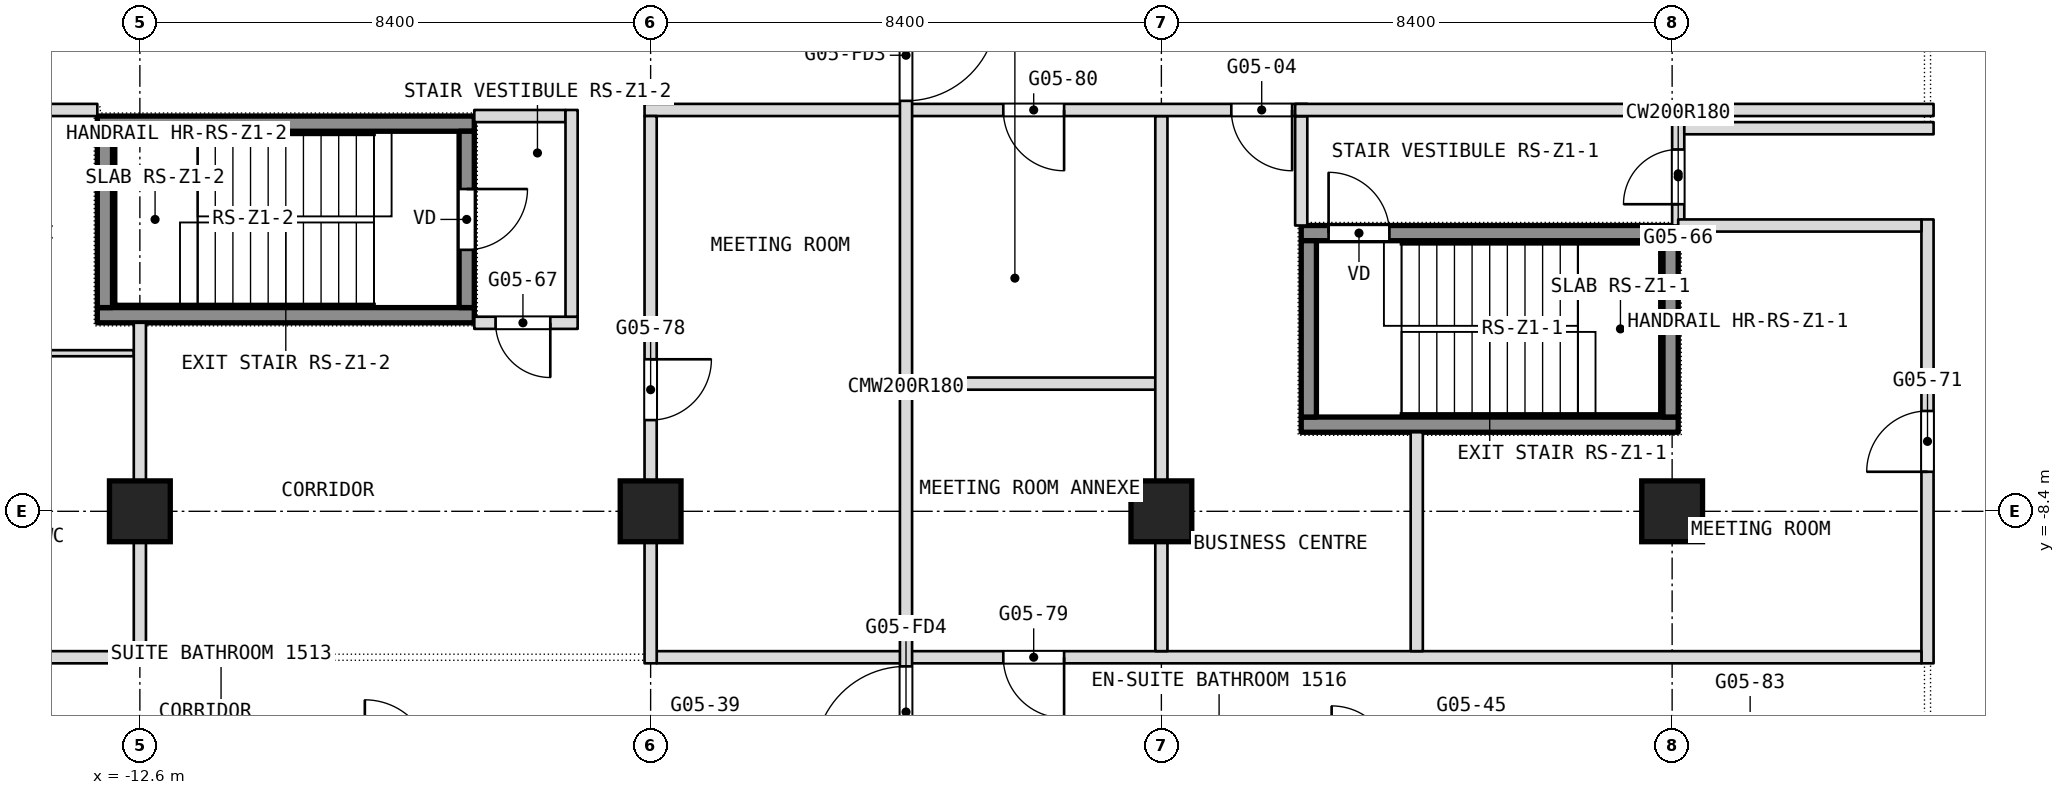
"""IFC4 building model, lengths in metres.
Left out: names, types, materials, properties, quantities, classifications, styles, units other than length and angle.
Written with IfcOpenShell. Run it as: python <this file> out.ifc"""

import sys

from ifc_helpers import new_model, si_unit, direction, frame, frame_2d, origin, origin_2d, place, context, subcontext, project, spatial, rectangle, extrude, element, fill, save


model = new_model("IFC4")
c1 = context("Model", 3, precision=1e-05, world=origin(), true_north=direction((0.0, 1.0)))
c2 = subcontext(c1, "Body", "Model", "MODEL_VIEW")
j1 = project(units=[si_unit("LENGTHUNIT", "METRE"), si_unit("PLANEANGLEUNIT", "RADIAN")], contexts=[c1])
p1 = place(None, origin())
s1 = spatial("IfcSite", under=j1, at=p1, CompositionType="ELEMENT")
p2 = place(p1, origin())
s2 = spatial("IfcBuilding", under=s1, at=p2, CompositionType="ELEMENT")
p3 = place(p2, frame((0.0, 0.0, 68.9)))
s3 = spatial("IfcBuildingStorey", under=s2, at=p3, CompositionType="ELEMENT", Elevation=68.9)
for number, where, z_axis, x_axis in (
    (1, (-12.6, -8.4, 0.0), (0.0, 0.0, 1.0), (1.0, 0.0, 0.0)),
    (2, (-4.2, -8.4, 0.0), (0.0, 0.0, 1.0), (1.0, 0.0, 0.0)),
    (3, (4.2, -8.4, 0.0), (0.0, 0.0, 1.0), (1.0, 0.0, 0.0)),
    (4, (12.6, -8.4, 0.0), (0.0, 0.0, 1.0), (1.0, 0.0, 0.0)),
):
    element("IfcColumn", number, at=place(p3, frame(where, z_axis=z_axis, x_axis=x_axis)), inside=s3, PredefinedType="COLUMN", context=c2, shape_type="SweptSolid", body=[
        extrude(rectangle(XDim=1.0, YDim=1.0, at=origin_2d()), origin(), (0.0, 0.0, 1.0), 3.6),
    ])
p4 = place(p3, frame((16.8, -10.9, 0.0), z_axis=(0.0, 0.0, 1.0), x_axis=(0.0, 1.0, 0.0)))
e5 = element("IfcWall", 5, at=p4, inside=s3, PredefinedType="PARTITIONING", context=c2, shape_type="SweptSolid", body=[
    extrude(rectangle(XDim=7.3, YDim=0.2, at=frame_2d((3.65, 0.0))), origin(), (0.0, 0.0, 1.0), 3.34),
])
p5 = place(p4, frame((3.15, 0.0, 0.0)))
e6 = element("IfcOpeningElement", 6, at=p5, cuts=e5, PredefinedType="OPENING", context=c2, shape_type="SweptSolid", body=[
    extrude(rectangle(XDim=1.0, YDim=2.1, at=frame_2d((0.5, 1.05))), frame((0.0, 0.1, 0.0), z_axis=(0.0, -1.0, 0.0), x_axis=(1.0, 0.0, 0.0)), (0.0, 0.0, 1.0), 0.2),
])
p6 = place(p3, frame((12.7, -3.7, 0.0), z_axis=(0.0, 0.0, 1.0), x_axis=(0.0, 1.0, 0.0)))
e7 = element("IfcWall", 7, at=p6, inside=s3, PredefinedType="PARTITIONING", context=c2, shape_type="SweptSolid", body=[
    extrude(rectangle(XDim=1.7, YDim=0.2, at=frame_2d((0.85, 0.0))), origin(), (0.0, 0.0, 1.0), 3.34),
])
p7 = place(p6, frame((0.35, 0.0, 0.0)))
e8 = element("IfcOpeningElement", 8, at=p7, cuts=e7, PredefinedType="OPENING", context=c2, shape_type="SweptSolid", body=[
    extrude(rectangle(XDim=0.9, YDim=2.1, at=frame_2d((0.45, 1.05))), frame((0.0, 0.1, 0.0), z_axis=(0.0, -1.0, 0.0), x_axis=(1.0, 0.0, 0.0)), (0.0, 0.0, 1.0), 0.2),
])
p8 = place(p3, frame((-16.7, -10.8, 0.0), z_axis=(0.0, 0.0, 1.0), x_axis=(1.0, 0.0, 0.0)))
e9 = element("IfcWall", 9, at=p8, inside=s3, PredefinedType="PARTITIONING", context=c2, shape_type="SweptSolid", body=[
    extrude(rectangle(XDim=4.0, YDim=0.2, at=frame_2d((2.0, 0.0))), origin(), (0.0, 0.0, 1.0), 3.34),
])
p9 = place(p3, frame((-4.1, -10.8, 0.0), z_axis=(0.0, 0.0, 1.0), x_axis=(1.0, 0.0, 0.0)))
e10 = element("IfcWall", 10, at=p9, inside=s3, PredefinedType="PARTITIONING", context=c2, shape_type="SweptSolid", body=[
    extrude(rectangle(XDim=20.8, YDim=0.2, at=frame_2d((10.4, 0.0))), origin(), (0.0, 0.0, 1.0), 3.34),
])
p10 = place(p9, frame((5.7, 0.0, 0.0)))
e11 = element("IfcOpeningElement", 11, at=p10, cuts=e10, PredefinedType="OPENING", context=c2, shape_type="SweptSolid", body=[
    extrude(rectangle(XDim=1.0, YDim=2.1, at=frame_2d((0.5, 1.05))), frame((0.0, 0.1, 0.0), z_axis=(0.0, -1.0, 0.0), x_axis=(1.0, 0.0, 0.0)), (0.0, 0.0, 1.0), 0.2),
])
p11 = place(p3, frame((8.4, -10.7, 0.0), z_axis=(0.0, 0.0, 1.0), x_axis=(0.0, 1.0, 0.0)))
e12 = element("IfcWall", 12, at=p11, inside=s3, PredefinedType="PARTITIONING", context=c2, shape_type="SweptSolid", body=[
    extrude(rectangle(XDim=3.6, YDim=0.2, at=frame_2d((1.8, 0.0))), origin(), (0.0, 0.0, 1.0), 3.34),
])
p12 = place(p3, frame((6.5, -3.7, 0.0), z_axis=(0.0, 0.0, 1.0), x_axis=(0.0, 1.0, 0.0)))
e13 = element("IfcWall", 13, at=p12, inside=s3, PredefinedType="PARTITIONING", context=c2, shape_type="SweptSolid", body=[
    extrude(rectangle(XDim=1.8, YDim=0.2, at=frame_2d((0.9, 0.0))), origin(), (0.0, 0.0, 1.0), 3.34),
])
p13 = place(p3, frame((0.1, -6.3, 0.0), z_axis=(0.0, 0.0, 1.0), x_axis=(1.0, 0.0, 0.0)))
e14 = element("IfcWall", 14, at=p13, inside=s3, PredefinedType="PARTITIONING", context=c2, shape_type="SweptSolid", body=[
    extrude(rectangle(XDim=4.0, YDim=0.2, at=frame_2d((2.0, 0.0))), origin(), (0.0, 0.0, 1.0), 3.34),
])
p14 = place(p3, frame((-16.7, -5.8, 0.0), z_axis=(0.0, 0.0, 1.0), x_axis=(1.0, 0.0, 0.0)))
e15 = element("IfcWall", 15, at=p14, inside=s3, PredefinedType="PARTITIONING", context=c2, shape_type="SweptSolid", body=[
    extrude(rectangle(XDim=4.0, YDim=0.1, at=frame_2d((2.0, 0.0))), origin(), (0.0, 0.0, 1.0), 3.34),
])
p15 = place(p14, frame((1.55, 0.0, 0.0)))
e16 = element("IfcOpeningElement", 16, at=p15, cuts=e15, PredefinedType="OPENING", context=c2, shape_type="SweptSolid", body=[
    extrude(rectangle(XDim=0.9, YDim=2.1, at=frame_2d((0.45, 1.05))), frame((0.0, 0.05, 0.0), z_axis=(0.0, -1.0, 0.0), x_axis=(1.0, 0.0, 0.0)), (0.0, 0.0, 1.0), 0.1),
])
p16 = place(p3, frame((-7.1, -5.3, 0.0), z_axis=(0.0, 0.0, 1.0), x_axis=(1.0, 0.0, 0.0)))
e17 = element("IfcWall", 17, at=p16, inside=s3, PredefinedType="PARTITIONING", context=c2, shape_type="SweptSolid", body=[
    extrude(rectangle(XDim=1.7, YDim=0.2, at=frame_2d((0.85, 0.0))), origin(), (0.0, 0.0, 1.0), 3.34),
])
p17 = place(p16, frame((0.35, 0.0, 0.0)))
e18 = element("IfcOpeningElement", 18, at=p17, cuts=e17, PredefinedType="OPENING", context=c2, shape_type="SweptSolid", body=[
    extrude(rectangle(XDim=0.9, YDim=2.1, at=frame_2d((0.45, 1.05))), frame((0.0, 0.1, 0.0), z_axis=(0.0, -1.0, 0.0), x_axis=(1.0, 0.0, 0.0)), (0.0, 0.0, 1.0), 0.2),
])
p18 = place(p3, frame((4.2, -10.7, 0.0), z_axis=(0.0, 0.0, 1.0), x_axis=(0.0, 1.0, 0.0)))
e19 = element("IfcWall", 19, at=p18, inside=s3, PredefinedType="PARTITIONING", context=c2, shape_type="SweptSolid", body=[
    extrude(rectangle(XDim=8.8, YDim=0.2, at=frame_2d((4.4, 0.0))), origin(), (0.0, 0.0, 1.0), 3.34),
])
p19 = place(p3, frame((12.7, -3.7, 0.0), z_axis=(0.0, 0.0, 1.0), x_axis=(1.0, 0.0, 0.0)))
e20 = element("IfcWall", 20, at=p19, inside=s3, PredefinedType="PARTITIONING", context=c2, shape_type="SweptSolid", body=[
    extrude(rectangle(XDim=4.0, YDim=0.2, at=frame_2d((2.0, 0.0))), origin(), (0.0, 0.0, 1.0), 3.34),
])
p20 = place(p3, frame((12.8, -2.1, 0.0), z_axis=(0.0, 0.0, 1.0), x_axis=(1.0, 0.0, 0.0)))
e21 = element("IfcWall", 21, at=p20, inside=s3, PredefinedType="PARTITIONING", context=c2, shape_type="SweptSolid", body=[
    extrude(rectangle(XDim=4.1, YDim=0.2, at=frame_2d((2.05, 0.0))), origin(), (0.0, 0.0, 1.0), 3.34),
])
p21 = place(p3, frame((-7.1, -1.9, 0.0), z_axis=(0.0, 0.0, 1.0), x_axis=(1.0, 0.0, 0.0)))
e22 = element("IfcWall", 22, at=p21, inside=s3, PredefinedType="PARTITIONING", context=c2, shape_type="SweptSolid", body=[
    extrude(rectangle(XDim=1.5, YDim=0.2, at=frame_2d((0.75, 0.0))), origin(), (0.0, 0.0, 1.0), 3.34),
])
p22 = place(p3, frame((-16.9, -1.8, 0.0), z_axis=(0.0, 0.0, 1.0), x_axis=(1.0, 0.0, 0.0)))
e23 = element("IfcWall", 23, at=p22, inside=s3, PredefinedType="PARTITIONING", context=c2, shape_type="SweptSolid", body=[
    extrude(rectangle(XDim=3.6, YDim=0.2, at=frame_2d((1.8, 0.0))), origin(), (0.0, 0.0, 1.0), 3.34),
])
p23 = place(p22, frame((1.7, 0.0, 0.0)))
e24 = element("IfcOpeningElement", 24, at=p23, cuts=e23, PredefinedType="OPENING", context=c2, shape_type="SweptSolid", body=[
    extrude(rectangle(XDim=1.0, YDim=2.1, at=frame_2d((0.5, 1.05))), frame((0.0, 0.1, 0.0), z_axis=(0.0, -1.0, 0.0), x_axis=(1.0, 0.0, 0.0)), (0.0, 0.0, 1.0), 0.2),
])
p24 = place(p3, frame((-4.3, -1.8, 0.0), z_axis=(0.0, 0.0, 1.0), x_axis=(1.0, 0.0, 0.0)))
e25 = element("IfcWall", 25, at=p24, inside=s3, PredefinedType="PARTITIONING", context=c2, shape_type="SweptSolid", body=[
    extrude(rectangle(XDim=10.9, YDim=0.2, at=frame_2d((5.45, 0.0))), origin(), (0.0, 0.0, 1.0), 3.34),
])
p25 = place(p24, frame((9.65, 0.0, 0.0)))
e26 = element("IfcOpeningElement", 26, at=p25, cuts=e25, PredefinedType="OPENING", context=c2, shape_type="SweptSolid", body=[
    extrude(rectangle(XDim=1.0, YDim=2.1, at=frame_2d((0.5, 1.05))), frame((0.0, 0.1, 0.0), z_axis=(0.0, -1.0, 0.0), x_axis=(1.0, 0.0, 0.0)), (0.0, 0.0, 1.0), 0.2),
])
p26 = place(p24, frame((5.9, 0.0, 0.0)))
e27 = element("IfcOpeningElement", 27, at=p26, cuts=e25, PredefinedType="OPENING", context=c2, shape_type="SweptSolid", body=[
    extrude(rectangle(XDim=1.0, YDim=2.1, at=frame_2d((0.5, 1.05))), frame((0.0, 0.1, 0.0), z_axis=(0.0, -1.0, 0.0), x_axis=(1.0, 0.0, 0.0)), (0.0, 0.0, 1.0), 0.2),
])
p27 = place(p3, frame((6.4, -1.8, 0.0), z_axis=(0.0, 0.0, 1.0), x_axis=(1.0, 0.0, 0.0)))
e28 = element("IfcWall", 28, at=p27, inside=s3, PredefinedType="PARTITIONING", context=c2, shape_type="SweptSolid", body=[
    extrude(rectangle(XDim=10.5, YDim=0.2, at=frame_2d((5.25, 0.0))), origin(), (0.0, 0.0, 1.0), 3.34),
])
p28 = place(p3, frame((0.0, -12.7, 0.0), z_axis=(0.0, 0.0, 1.0), x_axis=(0.0, 1.0, 0.0)))
e29 = element("IfcWall", 29, at=p28, inside=s3, PredefinedType="PARTITIONING", context=c2, shape_type="SweptSolid", body=[
    extrude(rectangle(XDim=12.7, YDim=0.2, at=frame_2d((6.35, 0.0))), origin(), (0.0, 0.0, 1.0), 3.34),
])
p29 = place(p28, frame((11.05, 0.0, 0.0)))
e30 = element("IfcOpeningElement", 30, at=p29, cuts=e29, PredefinedType="OPENING", context=c2, shape_type="SweptSolid", body=[
    extrude(rectangle(XDim=1.5, YDim=2.1, at=frame_2d((0.75, 1.05))), frame((0.0, 0.1, 0.0), z_axis=(0.0, -1.0, 0.0), x_axis=(1.0, 0.0, 0.0)), (0.0, 0.0, 1.0), 0.2),
])
p30 = place(p28, frame((0.25, 0.0, 0.0)))
e31 = element("IfcOpeningElement", 31, at=p30, cuts=e29, PredefinedType="OPENING", context=c2, shape_type="SweptSolid", body=[
    extrude(rectangle(XDim=1.5, YDim=2.1, at=frame_2d((0.75, 1.05))), frame((0.0, 0.1, 0.0), z_axis=(0.0, -1.0, 0.0), x_axis=(1.0, 0.0, 0.0)), (0.0, 0.0, 1.0), 0.2),
])
p31 = place(p3, frame((-4.2, -10.9, 0.0), z_axis=(0.0, 0.0, 1.0), x_axis=(0.0, 1.0, 0.0)))
e32 = element("IfcWall", 32, at=p31, inside=s3, PredefinedType="PARTITIONING", context=c2, shape_type="SweptSolid", body=[
    extrude(rectangle(XDim=9.0, YDim=0.2, at=frame_2d((4.5, 0.0))), origin(), (0.0, 0.0, 1.0), 3.34),
])
p32 = place(p31, frame((4.0, 0.0, 0.0)))
e33 = element("IfcOpeningElement", 33, at=p32, cuts=e32, PredefinedType="OPENING", context=c2, shape_type="SweptSolid", body=[
    extrude(rectangle(XDim=1.0, YDim=2.1, at=frame_2d((0.5, 1.05))), frame((0.0, 0.1, 0.0), z_axis=(0.0, -1.0, 0.0), x_axis=(1.0, 0.0, 0.0)), (0.0, 0.0, 1.0), 0.2),
])
p33 = place(p3, frame((-5.5, -5.2, 0.0), z_axis=(0.0, 0.0, 1.0), x_axis=(0.0, 1.0, 0.0)))
e34 = element("IfcWall", 34, at=p33, inside=s3, PredefinedType="PARTITIONING", context=c2, shape_type="SweptSolid", body=[
    extrude(rectangle(XDim=3.4, YDim=0.2, at=frame_2d((1.7, 0.0))), origin(), (0.0, 0.0, 1.0), 3.34),
])
p34 = place(p3, frame((-12.6, -10.9, 0.0), z_axis=(0.0, 0.0, 1.0), x_axis=(0.0, 1.0, 0.0)))
e35 = element("IfcWall", 35, at=p34, inside=s3, PredefinedType="PARTITIONING", context=c2, shape_type="SweptSolid", body=[
    extrude(rectangle(XDim=5.6, YDim=0.2, at=frame_2d((2.8, 0.0))), origin(), (0.0, 0.0, 1.0), 3.34),
])
p35 = place(p3, frame((6.5, -6.975, 0.1), z_axis=(0.0, 0.0, 1.0), x_axis=(1.0, 0.0, 0.0)))
e36 = element("IfcWall", 36, at=p35, inside=s3, PredefinedType="SHEAR", context=c2, shape_type="SweptSolid", body=[
    extrude(rectangle(XDim=6.2, YDim=0.25, at=frame_2d((3.1, 0.0))), origin(), (0.0, 0.0, 1.0), 3.6),
])
p36 = place(p3, frame((6.5, -3.825, 0.1), z_axis=(0.0, 0.0, 1.0), x_axis=(1.0, 0.0, 0.0)))
e37 = element("IfcWall", 37, at=p36, inside=s3, PredefinedType="SHEAR", context=c2, shape_type="SweptSolid", body=[
    extrude(rectangle(XDim=6.2, YDim=0.25, at=frame_2d((3.1, 0.0))), origin(), (0.0, 0.0, 1.0), 3.6),
])
p37 = place(p36, frame((0.45, 0.0, 0.0)))
e38 = element("IfcOpeningElement", 38, at=p37, cuts=e37, PredefinedType="OPENING", context=c2, shape_type="SweptSolid", body=[
    extrude(rectangle(XDim=1.0, YDim=2.1, at=frame_2d((0.5, 1.05))), frame((0.0, 0.125, 0.0), z_axis=(0.0, -1.0, 0.0), x_axis=(1.0, 0.0, 0.0)), (0.0, 0.0, 1.0), 0.25),
])
for number, where, z_axis, x_axis in (
    (39, (6.625, -6.85, 0.1), (0.0, 0.0, 1.0), (0.0, 1.0, 0.0)),
    (40, (12.575, -6.85, 0.1), (0.0, 0.0, 1.0), (0.0, 1.0, 0.0)),
):
    element("IfcWall", number, at=place(p3, frame(where, z_axis=z_axis, x_axis=x_axis)), inside=s3, PredefinedType="SHEAR", context=c2, shape_type="SweptSolid", body=[
        extrude(rectangle(XDim=2.9, YDim=0.25, at=frame_2d((1.45, 0.0))), origin(), (0.0, 0.0, 1.0), 3.6),
    ])
for number, where, z_axis, x_axis in (
    (41, (-13.3, -5.175, 0.1), (0.0, 0.0, 1.0), (1.0, 0.0, 0.0)),
    (42, (-13.3, -2.025, 0.1), (0.0, 0.0, 1.0), (1.0, 0.0, 0.0)),
):
    element("IfcWall", number, at=place(p3, frame(where, z_axis=z_axis, x_axis=x_axis)), inside=s3, PredefinedType="SHEAR", context=c2, shape_type="SweptSolid", body=[
        extrude(rectangle(XDim=6.2, YDim=0.25, at=frame_2d((3.1, 0.0))), origin(), (0.0, 0.0, 1.0), 3.6),
    ])
p38 = place(p3, frame((-13.175, -5.05, 0.1), z_axis=(0.0, 0.0, 1.0), x_axis=(0.0, 1.0, 0.0)))
e43 = element("IfcWall", 43, at=p38, inside=s3, PredefinedType="SHEAR", context=c2, shape_type="SweptSolid", body=[
    extrude(rectangle(XDim=2.9, YDim=0.25, at=frame_2d((1.45, 0.0))), origin(), (0.0, 0.0, 1.0), 3.6),
])
p39 = place(p3, frame((-7.225, -5.05, 0.1), z_axis=(0.0, 0.0, 1.0), x_axis=(0.0, 1.0, 0.0)))
e44 = element("IfcWall", 44, at=p39, inside=s3, PredefinedType="SHEAR", context=c2, shape_type="SweptSolid", body=[
    extrude(rectangle(XDim=2.9, YDim=0.25, at=frame_2d((1.45, 0.0))), origin(), (0.0, 0.0, 1.0), 3.6),
])
p40 = place(p39, frame((0.95, 0.0, 0.0)))
e45 = element("IfcOpeningElement", 45, at=p40, cuts=e44, PredefinedType="OPENING", context=c2, shape_type="SweptSolid", body=[
    extrude(rectangle(XDim=1.0, YDim=2.1, at=frame_2d((0.5, 1.05))), frame((0.0, 0.125, 0.0), z_axis=(0.0, -1.0, 0.0), x_axis=(1.0, 0.0, 0.0)), (0.0, 0.0, 1.0), 0.25),
])
p41 = place(p5, origin())
e46 = element("IfcDoor", 46, at=p41, inside=s3, OperationType="SINGLE_SWING_LEFT", PredefinedType="DOOR", context=c2, shape_type="SweptSolid", body=[
    extrude(rectangle(XDim=1.0, YDim=2.1, at=frame_2d((0.5, 1.05))), frame((0.0, 0.025, 0.0), z_axis=(0.0, -1.0, 0.0), x_axis=(1.0, 0.0, 0.0)), (0.0, 0.0, 1.0), 0.05),
])
fill(e6, e46)
p42 = place(p7, origin())
e47 = element("IfcDoor", 47, at=p42, inside=s3, OperationType="SINGLE_SWING_LEFT", PredefinedType="DOOR", context=c2, shape_type="SweptSolid", body=[
    extrude(rectangle(XDim=0.9, YDim=2.1, at=frame_2d((0.45, 1.05))), frame((0.0, 0.025, 0.0), z_axis=(0.0, -1.0, 0.0), x_axis=(1.0, 0.0, 0.0)), (0.0, 0.0, 1.0), 0.05),
])
fill(e8, e47)
p43 = place(p10, origin())
e48 = element("IfcDoor", 48, at=p43, inside=s3, OperationType="SINGLE_SWING_LEFT", PredefinedType="DOOR", context=c2, shape_type="SweptSolid", body=[
    extrude(rectangle(XDim=1.0, YDim=2.1, at=frame_2d((0.5, 1.05))), frame((0.0, 0.025, 0.0), z_axis=(0.0, -1.0, 0.0), x_axis=(1.0, 0.0, 0.0)), (0.0, 0.0, 1.0), 0.05),
])
fill(e11, e48)
p44 = place(p17, origin())
e49 = element("IfcDoor", 49, at=p44, inside=s3, OperationType="SINGLE_SWING_RIGHT", PredefinedType="DOOR", context=c2, shape_type="SweptSolid", body=[
    extrude(rectangle(XDim=0.9, YDim=2.1, at=frame_2d((0.45, 1.05))), frame((0.0, 0.025, 0.0), z_axis=(0.0, -1.0, 0.0), x_axis=(1.0, 0.0, 0.0)), (0.0, 0.0, 1.0), 0.05),
])
fill(e18, e49)
p45 = place(p25, origin())
e50 = element("IfcDoor", 50, at=p45, inside=s3, OperationType="SINGLE_SWING_LEFT", PredefinedType="DOOR", context=c2, shape_type="SweptSolid", body=[
    extrude(rectangle(XDim=1.0, YDim=2.1, at=frame_2d((0.5, 1.05))), frame((0.0, 0.025, 0.0), z_axis=(0.0, -1.0, 0.0), x_axis=(1.0, 0.0, 0.0)), (0.0, 0.0, 1.0), 0.05),
])
fill(e26, e50)
p46 = place(p26, origin())
e51 = element("IfcDoor", 51, at=p46, inside=s3, OperationType="SINGLE_SWING_RIGHT", PredefinedType="DOOR", context=c2, shape_type="SweptSolid", body=[
    extrude(rectangle(XDim=1.0, YDim=2.1, at=frame_2d((0.5, 1.05))), frame((0.0, 0.025, 0.0), z_axis=(0.0, -1.0, 0.0), x_axis=(1.0, 0.0, 0.0)), (0.0, 0.0, 1.0), 0.05),
])
fill(e27, e51)
p47 = place(p32, origin())
e52 = element("IfcDoor", 52, at=p47, inside=s3, OperationType="SINGLE_SWING_LEFT", PredefinedType="DOOR", context=c2, shape_type="SweptSolid", body=[
    extrude(rectangle(XDim=1.0, YDim=2.1, at=frame_2d((0.5, 1.05))), frame((0.0, 0.025, 0.0), z_axis=(0.0, -1.0, 0.0), x_axis=(1.0, 0.0, 0.0)), (0.0, 0.0, 1.0), 0.05),
])
fill(e33, e52)
p48 = place(p37, origin())
e53 = element("IfcDoor", 53, at=p48, inside=s3, OperationType="SINGLE_SWING_LEFT", PredefinedType="DOOR", context=c2, shape_type="SweptSolid", body=[
    extrude(rectangle(XDim=1.0, YDim=2.1, at=frame_2d((0.5, 1.05))), frame((0.0, 0.025, 0.0), z_axis=(0.0, -1.0, 0.0), x_axis=(1.0, 0.0, 0.0)), (0.0, 0.0, 1.0), 0.05),
])
fill(e38, e53)
p49 = place(p40, origin())
e54 = element("IfcDoor", 54, at=p49, inside=s3, OperationType="SINGLE_SWING_LEFT", PredefinedType="DOOR", context=c2, shape_type="SweptSolid", body=[
    extrude(rectangle(XDim=1.0, YDim=2.1, at=frame_2d((0.5, 1.05))), frame((0.0, 0.025, 0.0), z_axis=(0.0, -1.0, 0.0), x_axis=(1.0, 0.0, 0.0)), (0.0, 0.0, 1.0), 0.05),
])
fill(e45, e54)
p50 = place(p29, origin())
e55 = element("IfcDoor", 55, at=p50, inside=s3, OperationType="DOUBLE_DOOR_DOUBLE_SWING", PredefinedType="DOOR", context=c2, shape_type="SweptSolid", body=[
    extrude(rectangle(XDim=1.5, YDim=2.1, at=frame_2d((0.75, 1.05))), frame((0.0, 0.025, 0.0), z_axis=(0.0, -1.0, 0.0), x_axis=(1.0, 0.0, 0.0)), (0.0, 0.0, 1.0), 0.05),
])
fill(e30, e55)
p51 = place(p30, origin())
e56 = element("IfcDoor", 56, at=p51, inside=s3, OperationType="DOUBLE_DOOR_DOUBLE_SWING", PredefinedType="DOOR", context=c2, shape_type="SweptSolid", body=[
    extrude(rectangle(XDim=1.5, YDim=2.1, at=frame_2d((0.75, 1.05))), frame((0.0, 0.025, 0.0), z_axis=(0.0, -1.0, 0.0), x_axis=(1.0, 0.0, 0.0)), (0.0, 0.0, 1.0), 0.05),
])
fill(e31, e56)
save(model, sys.argv[1])
